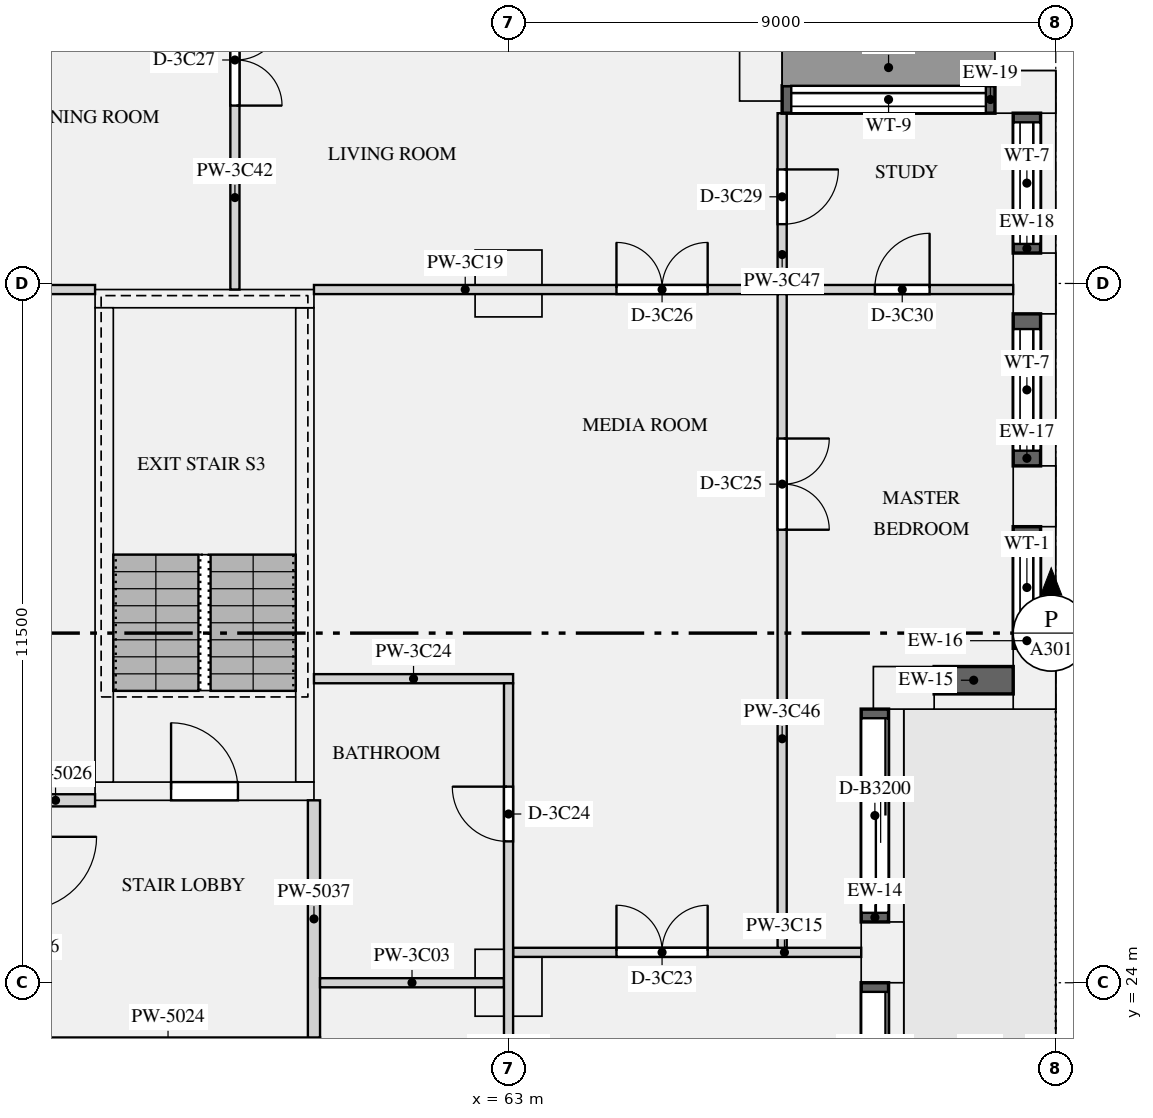
"""IFC4 building model, lengths in metres.
Left out: names, types, materials, properties, quantities, classifications, styles, units other than length and angle.
Written with IfcOpenShell. Run it as: python <this file> out.ifc"""

import sys

from ifc_helpers import new_model, si_unit, direction, frame, frame_2d, origin, origin_2d, place, context, subcontext, project, spatial, rectangle, extrude, element, fill, save


model = new_model("IFC4")
c1 = context("Model", 3, precision=1e-05, world=origin(), true_north=direction((0.0, 1.0)))
c2 = subcontext(c1, "Body", "Model", "MODEL_VIEW")
j1 = project(units=[si_unit("LENGTHUNIT", "METRE"), si_unit("PLANEANGLEUNIT", "RADIAN")], contexts=[c1])
p1 = place(None, origin())
s1 = spatial("IfcSite", under=j1, at=p1, CompositionType="ELEMENT")
p2 = place(p1, origin())
s2 = spatial("IfcBuilding", under=s1, at=p2, CompositionType="ELEMENT")
p3 = place(p2, frame((0.0, 0.0, 160.2)))
s3 = spatial("IfcBuildingStorey", under=s2, at=p3, CompositionType="ELEMENT", Elevation=160.2)
for number, where, z_axis, x_axis in (
    (1, (69.15, 24.5, 0.0), (0.0, 0.0, 1.0), (0.0, 1.0, 0.0)),
    (2, (69.5, 28.85, 0.0), (0.0, 0.0, 1.0), (1.0, 0.0, 0.0)),
    (3, (71.65, 29.0, 0.0), (0.0, 0.0, 1.0), (0.0, 1.0, 0.0)),
    (4, (71.65, 32.0, 0.0), (0.0, 0.0, 1.0), (0.0, 1.0, 0.0)),
    (5, (71.65, 35.5, 0.0), (0.0, 0.0, 1.0), (0.0, 1.0, 0.0)),
    (6, (71.5, 38.65, 0.0), (0.0, 0.0, 1.0), (-1.0, 0.0, 0.0)),
    (7, (67.15, 39.0, 0.0), (0.0, 0.0, 1.0), (0.0, 1.0, 0.0)),
):
    element("IfcColumn", number, at=place(p3, frame(where, z_axis=z_axis, x_axis=x_axis)), inside=s3, PredefinedType="USERDEFINED", context=c2, shape_type="SweptSolid", body=[
        extrude(rectangle(XDim=1.0, YDim=0.7, at=origin_2d()), origin(), (0.0, 0.0, 1.0), 3.15),
    ])
for number, where, z_axis, x_axis in (
    (8, (63.0, 24.0, 0.0), (0.0, 0.0, 1.0), (1.0, 0.0, 0.0)),
    (9, (63.0, 35.5, 0.0), (0.0, 0.0, 1.0), (1.0, 0.0, 0.0)),
):
    element("IfcColumn", number, at=place(p3, frame(where, z_axis=z_axis, x_axis=x_axis)), inside=s3, PredefinedType="COLUMN", context=c2, shape_type="SweptSolid", body=[
        extrude(rectangle(XDim=1.1, YDim=1.1, at=origin_2d()), origin(), (0.0, 0.0, 1.0), 3.15),
    ])
p4 = place(p3, frame((56.2, 27.15, 0.0), z_axis=(0.0, 0.0, 1.0), x_axis=(1.0, 0.0, 0.0)))
e10 = element("IfcWall", 10, at=p4, inside=s3, PredefinedType="SHEAR", context=c2, shape_type="SweptSolid", body=[
    extrude(rectangle(XDim=3.6, YDim=0.3, at=frame_2d((1.8, 0.0))), origin(), (0.0, 0.0, 1.0), 3.15),
])
p5 = place(p4, frame((1.25, 0.0, 0.0)))
e11 = element("IfcOpeningElement", 11, at=p5, cuts=e10, PredefinedType="OPENING", context=c2, shape_type="SweptSolid", body=[
    extrude(rectangle(XDim=1.1, YDim=2.1, at=frame_2d((0.55, 1.05))), frame((0.0, 0.16, 0.0), z_axis=(0.0, -1.0, 0.0), x_axis=(1.0, 0.0, 0.0)), (0.0, 0.0, 1.0), 0.32),
])
p6 = place(p3, frame((56.2, 35.25, 0.0), z_axis=(0.0, 0.0, 1.0), x_axis=(1.0, 0.0, 0.0)))
e12 = element("IfcWall", 12, at=p6, inside=s3, PredefinedType="SHEAR", context=c2, shape_type="SweptSolid", body=[
    extrude(rectangle(XDim=3.6, YDim=0.3, at=frame_2d((1.8, 0.0))), origin(), (0.0, 0.0, 1.0), 3.15),
])
for number, where, z_axis, x_axis in (
    (13, (56.35, 27.3, 0.0), (0.0, 0.0, 1.0), (0.0, 1.0, 0.0)),
    (14, (59.65, 27.3, 0.0), (0.0, 0.0, 1.0), (0.0, 1.0, 0.0)),
):
    element("IfcWall", number, at=place(p3, frame(where, z_axis=z_axis, x_axis=x_axis)), inside=s3, PredefinedType="SHEAR", context=c2, shape_type="SweptSolid", body=[
        extrude(rectangle(XDim=7.8, YDim=0.3, at=frame_2d((3.9, 0.0))), origin(), (0.0, 0.0, 1.0), 3.15),
    ])
p7 = place(p3, frame((69.025, 21.0, 0.0), z_axis=(0.0, 0.0, 1.0), x_axis=(0.0, 1.0, 0.0)))
e15 = element("IfcWall", 15, at=p7, inside=s3, PredefinedType="SOLIDWALL", context=c2, shape_type="SweptSolid", body=[
    extrude(rectangle(XDim=3.0, YDim=0.45, at=frame_2d((1.5, 0.0))), origin(), (0.0, 0.0, 1.0), 2.83),
])
p8 = place(p7, frame((0.15, 0.0, 0.0)))
e16 = element("IfcOpeningElement", 16, at=p8, cuts=e15, PredefinedType="OPENING", context=c2, shape_type="SweptSolid", body=[
    extrude(rectangle(XDim=2.7, YDim=2.3, at=frame_2d((1.35, 1.15))), frame((0.0, 0.235, 0.0), z_axis=(0.0, -1.0, 0.0), x_axis=(1.0, 0.0, 0.0)), (0.0, 0.0, 1.0), 0.47),
])
p9 = place(p3, frame((69.025, 25.0, 0.0), z_axis=(0.0, 0.0, 1.0), x_axis=(0.0, 1.0, 0.0)))
e17 = element("IfcWall", 17, at=p9, inside=s3, PredefinedType="SOLIDWALL", context=c2, shape_type="SweptSolid", body=[
    extrude(rectangle(XDim=3.5, YDim=0.45, at=frame_2d((1.75, 0.0))), origin(), (0.0, 0.0, 1.0), 2.83),
])
p10 = place(p9, frame((0.15, 0.0, 0.0)))
e18 = element("IfcOpeningElement", 18, at=p10, cuts=e17, PredefinedType="OPENING", context=c2, shape_type="SweptSolid", body=[
    extrude(rectangle(XDim=3.2, YDim=2.3, at=frame_2d((1.6, 1.15))), frame((0.0, 0.235, 0.0), z_axis=(0.0, -1.0, 0.0), x_axis=(1.0, 0.0, 0.0)), (0.0, 0.0, 1.0), 0.47),
])
p11 = place(p3, frame((70.0, 28.975, 0.9), z_axis=(0.0, 0.0, 1.0), x_axis=(1.0, 0.0, 0.0)))
e19 = element("IfcWall", 19, at=p11, inside=s3, PredefinedType="SOLIDWALL", context=c2, shape_type="SweptSolid", body=[
    extrude(rectangle(XDim=1.3, YDim=0.45, at=frame_2d((0.65, 0.0))), origin(), (0.0, 0.0, 1.0), 1.93),
])
p12 = place(p3, frame((71.525, 29.5, 0.9), z_axis=(0.0, 0.0, 1.0), x_axis=(0.0, 1.0, 0.0)))
e20 = element("IfcWall", 20, at=p12, inside=s3, PredefinedType="SOLIDWALL", context=c2, shape_type="SweptSolid", body=[
    extrude(rectangle(XDim=2.0, YDim=0.45, at=frame_2d((1.0, 0.0))), origin(), (0.0, 0.0, 1.0), 1.93),
])
p13 = place(p12, frame((0.25, 0.0, 0.15)))
e21 = element("IfcOpeningElement", 21, at=p13, cuts=e20, PredefinedType="OPENING", context=c2, shape_type="SweptSolid", body=[
    extrude(rectangle(XDim=1.5, YDim=1.5, at=frame_2d((0.75, 0.75))), frame((0.0, 0.235, 0.0), z_axis=(0.0, -1.0, 0.0), x_axis=(1.0, 0.0, 0.0)), (0.0, 0.0, 1.0), 0.47),
])
p14 = place(p3, frame((71.525, 32.5, 0.9), z_axis=(0.0, 0.0, 1.0), x_axis=(0.0, 1.0, 0.0)))
e22 = element("IfcWall", 22, at=p14, inside=s3, PredefinedType="SOLIDWALL", context=c2, shape_type="SweptSolid", body=[
    extrude(rectangle(XDim=2.5, YDim=0.45, at=frame_2d((1.25, 0.0))), origin(), (0.0, 0.0, 1.0), 1.93),
])
p15 = place(p14, frame((0.25, 0.0, 0.15)))
e23 = element("IfcOpeningElement", 23, at=p15, cuts=e22, PredefinedType="OPENING", context=c2, shape_type="SweptSolid", body=[
    extrude(rectangle(XDim=2.0, YDim=1.5, at=frame_2d((1.0, 0.75))), frame((0.0, 0.235, 0.0), z_axis=(0.0, -1.0, 0.0), x_axis=(1.0, 0.0, 0.0)), (0.0, 0.0, 1.0), 0.47),
])
p16 = place(p3, frame((71.525, 36.0, 0.9), z_axis=(0.0, 0.0, 1.0), x_axis=(0.0, 1.0, 0.0)))
e24 = element("IfcWall", 24, at=p16, inside=s3, PredefinedType="SOLIDWALL", context=c2, shape_type="SweptSolid", body=[
    extrude(rectangle(XDim=2.3, YDim=0.45, at=frame_2d((1.15, 0.0))), origin(), (0.0, 0.0, 1.0), 1.93),
])
p17 = place(p16, frame((0.15, 0.0, 0.15)))
e25 = element("IfcOpeningElement", 25, at=p17, cuts=e24, PredefinedType="OPENING", context=c2, shape_type="SweptSolid", body=[
    extrude(rectangle(XDim=2.0, YDim=1.5, at=frame_2d((1.0, 0.75))), frame((0.0, 0.235, 0.0), z_axis=(0.0, -1.0, 0.0), x_axis=(1.0, 0.0, 0.0)), (0.0, 0.0, 1.0), 0.47),
])
p18 = place(p3, frame((71.0, 38.525, 0.9), z_axis=(0.0, 0.0, 1.0), x_axis=(-1.0, 0.0, 0.0)))
e26 = element("IfcWall", 26, at=p18, inside=s3, PredefinedType="SOLIDWALL", context=c2, shape_type="SweptSolid", body=[
    extrude(rectangle(XDim=3.5, YDim=0.45, at=frame_2d((1.75, 0.0))), origin(), (0.0, 0.0, 1.0), 1.93),
])
p19 = place(p18, frame((0.15, 0.0, 0.15)))
e27 = element("IfcOpeningElement", 27, at=p19, cuts=e26, PredefinedType="OPENING", context=c2, shape_type="SweptSolid", body=[
    extrude(rectangle(XDim=3.2, YDim=1.5, at=frame_2d((1.6, 0.75))), frame((0.0, 0.235, 0.0), z_axis=(0.0, -1.0, 0.0), x_axis=(1.0, 0.0, 0.0)), (0.0, 0.0, 1.0), 0.47),
])
p20 = place(p3, frame((54.9, 23.0, 0.0), z_axis=(0.0, 0.0, 1.0), x_axis=(1.0, 0.0, 0.0)))
e28 = element("IfcWall", 28, at=p20, inside=s3, PredefinedType="PARTITIONING", context=c2, shape_type="SweptSolid", body=[
    extrude(rectangle(XDim=5.0, YDim=0.2, at=frame_2d((2.5, 0.0))), origin(), (0.0, 0.0, 1.0), 2.83),
])
p21 = place(p3, frame((54.9, 27.0, 0.0), z_axis=(0.0, 0.0, 1.0), x_axis=(1.0, 0.0, 0.0)))
e29 = element("IfcWall", 29, at=p21, inside=s3, PredefinedType="PARTITIONING", context=c2, shape_type="SweptSolid", body=[
    extrude(rectangle(XDim=1.3, YDim=0.2, at=frame_2d((0.65, 0.0))), origin(), (0.0, 0.0, 1.0), 2.83),
])
p22 = place(p3, frame((59.8, 23.1, 0.0), z_axis=(0.0, 0.0, 1.0), x_axis=(0.0, 1.0, 0.0)))
e30 = element("IfcWall", 30, at=p22, inside=s3, PredefinedType="PARTITIONING", context=c2, shape_type="SweptSolid", body=[
    extrude(rectangle(XDim=3.9, YDim=0.2, at=frame_2d((1.95, 0.0))), origin(), (0.0, 0.0, 1.0), 2.83),
])
p23 = place(p3, frame((59.9, 24.0, 0.0), z_axis=(0.0, 0.0, 1.0), x_axis=(1.0, 0.0, 0.0)))
e31 = element("IfcWall", 31, at=p23, inside=s3, PredefinedType="PARTITIONING", context=c2, shape_type="SweptSolid", body=[
    extrude(rectangle(XDim=3.025, YDim=0.15, at=frame_2d((1.513, 0.0))), origin(), (0.0, 0.0, 1.0), 2.83),
])
p24 = place(p3, frame((63.075, 24.5, 0.0), z_axis=(0.0, 0.0, 1.0), x_axis=(1.0, 0.0, 0.0)))
e32 = element("IfcWall", 32, at=p24, inside=s3, PredefinedType="PARTITIONING", context=c2, shape_type="SweptSolid", body=[
    extrude(rectangle(XDim=5.725, YDim=0.15, at=frame_2d((2.863, 0.0))), origin(), (0.0, 0.0, 1.0), 2.83),
])
p25 = place(p24, frame((1.7, 0.0, 0.0)))
e33 = element("IfcOpeningElement", 33, at=p25, cuts=e32, PredefinedType="OPENING", context=c2, shape_type="SweptSolid", body=[
    extrude(rectangle(XDim=1.5, YDim=2.1, at=frame_2d((0.75, 1.05))), frame((0.0, 0.085, 0.0), z_axis=(0.0, -1.0, 0.0), x_axis=(1.0, 0.0, 0.0)), (0.0, 0.0, 1.0), 0.17),
])
p26 = place(p3, frame((49.425, 35.4, 0.0), z_axis=(0.0, 0.0, 1.0), x_axis=(1.0, 0.0, 0.0)))
e34 = element("IfcWall", 34, at=p26, inside=s3, PredefinedType="PARTITIONING", context=c2, shape_type="SweptSolid", body=[
    extrude(rectangle(XDim=6.775, YDim=0.15, at=frame_2d((3.387, 0.0))), origin(), (0.0, 0.0, 1.0), 2.83),
])
p27 = place(p26, frame((1.6, 0.0, 0.0)))
e35 = element("IfcOpeningElement", 35, at=p27, cuts=e34, PredefinedType="OPENING", context=c2, shape_type="SweptSolid", body=[
    extrude(rectangle(XDim=0.9, YDim=2.1, at=frame_2d((0.45, 1.05))), frame((0.0, 0.085, 0.0), z_axis=(0.0, -1.0, 0.0), x_axis=(1.0, 0.0, 0.0)), (0.0, 0.0, 1.0), 0.17),
])
p28 = place(p3, frame((59.8, 35.4, 0.0), z_axis=(0.0, 0.0, 1.0), x_axis=(1.0, 0.0, 0.0)))
e36 = element("IfcWall", 36, at=p28, inside=s3, PredefinedType="PARTITIONING", context=c2, shape_type="SweptSolid", body=[
    extrude(rectangle(XDim=11.5, YDim=0.15, at=frame_2d((5.75, 0.0))), origin(), (0.0, 0.0, 1.0), 2.83),
])
p29 = place(p28, frame((4.975, 0.0, 0.0)))
e37 = element("IfcOpeningElement", 37, at=p29, cuts=e36, PredefinedType="OPENING", context=c2, shape_type="SweptSolid", body=[
    extrude(rectangle(XDim=1.5, YDim=2.1, at=frame_2d((0.75, 1.05))), frame((0.0, 0.085, 0.0), z_axis=(0.0, -1.0, 0.0), x_axis=(1.0, 0.0, 0.0)), (0.0, 0.0, 1.0), 0.17),
])
p30 = place(p28, frame((9.225, 0.0, 0.0)))
e38 = element("IfcOpeningElement", 38, at=p30, cuts=e36, PredefinedType="OPENING", context=c2, shape_type="SweptSolid", body=[
    extrude(rectangle(XDim=0.9, YDim=2.1, at=frame_2d((0.45, 1.05))), frame((0.0, 0.085, 0.0), z_axis=(0.0, -1.0, 0.0), x_axis=(1.0, 0.0, 0.0)), (0.0, 0.0, 1.0), 0.17),
])
p31 = place(p3, frame((59.8, 29.0, 0.0), z_axis=(0.0, 0.0, 1.0), x_axis=(1.0, 0.0, 0.0)))
e39 = element("IfcWall", 39, at=p31, inside=s3, PredefinedType="PARTITIONING", context=c2, shape_type="SweptSolid", body=[
    extrude(rectangle(XDim=3.275, YDim=0.15, at=frame_2d((1.637, 0.0))), origin(), (0.0, 0.0, 1.0), 2.83),
])
p32 = place(p3, frame((58.5, 35.4, 0.0), z_axis=(0.0, 0.0, 1.0), x_axis=(0.0, 1.0, 0.0)))
e40 = element("IfcWall", 40, at=p32, inside=s3, PredefinedType="PARTITIONING", context=c2, shape_type="SweptSolid", body=[
    extrude(rectangle(XDim=7.4, YDim=0.15, at=frame_2d((3.7, 0.0))), origin(), (0.0, 0.0, 1.0), 2.83),
])
p33 = place(p32, frame((3.025, 0.0, 0.0)))
e41 = element("IfcOpeningElement", 41, at=p33, cuts=e40, PredefinedType="OPENING", context=c2, shape_type="SweptSolid", body=[
    extrude(rectangle(XDim=1.5, YDim=2.1, at=frame_2d((0.75, 1.05))), frame((0.0, 0.085, 0.0), z_axis=(0.0, -1.0, 0.0), x_axis=(1.0, 0.0, 0.0)), (0.0, 0.0, 1.0), 0.17),
])
p34 = place(p3, frame((63.0, 12.575, 0.0), z_axis=(0.0, 0.0, 1.0), x_axis=(0.0, 1.0, 0.0)))
e42 = element("IfcWall", 42, at=p34, inside=s3, PredefinedType="PARTITIONING", context=c2, shape_type="SweptSolid", body=[
    extrude(rectangle(XDim=16.35, YDim=0.15, at=frame_2d((8.175, 0.0))), origin(), (0.0, 0.0, 1.0), 2.83),
])
p35 = place(p34, frame((5.225, 0.0, 0.0)))
e43 = element("IfcOpeningElement", 43, at=p35, cuts=e42, PredefinedType="OPENING", context=c2, shape_type="SweptSolid", body=[
    extrude(rectangle(XDim=0.9, YDim=2.1, at=frame_2d((0.45, 1.05))), frame((0.0, 0.085, 0.0), z_axis=(0.0, -1.0, 0.0), x_axis=(1.0, 0.0, 0.0)), (0.0, 0.0, 1.0), 0.17),
])
p36 = place(p34, frame((13.75, 0.0, 0.0)))
e44 = element("IfcOpeningElement", 44, at=p36, cuts=e42, PredefinedType="OPENING", context=c2, shape_type="SweptSolid", body=[
    extrude(rectangle(XDim=0.9, YDim=2.1, at=frame_2d((0.45, 1.05))), frame((0.0, 0.085, 0.0), z_axis=(0.0, -1.0, 0.0), x_axis=(1.0, 0.0, 0.0)), (0.0, 0.0, 1.0), 0.17),
])
p37 = place(p3, frame((67.5, 24.575, 0.0), z_axis=(0.0, 0.0, 1.0), x_axis=(0.0, 1.0, 0.0)))
e45 = element("IfcWall", 45, at=p37, inside=s3, PredefinedType="PARTITIONING", context=c2, shape_type="SweptSolid", body=[
    extrude(rectangle(XDim=10.75, YDim=0.15, at=frame_2d((5.375, 0.0))), origin(), (0.0, 0.0, 1.0), 2.83),
])
p38 = place(p37, frame((6.875, 0.0, 0.0)))
e46 = element("IfcOpeningElement", 46, at=p38, cuts=e45, PredefinedType="OPENING", context=c2, shape_type="SweptSolid", body=[
    extrude(rectangle(XDim=1.5, YDim=2.1, at=frame_2d((0.75, 1.05))), frame((0.0, 0.085, 0.0), z_axis=(0.0, -1.0, 0.0), x_axis=(1.0, 0.0, 0.0)), (0.0, 0.0, 1.0), 0.17),
])
p39 = place(p3, frame((67.5, 35.475, 0.0), z_axis=(0.0, 0.0, 1.0), x_axis=(0.0, 1.0, 0.0)))
e47 = element("IfcWall", 47, at=p39, inside=s3, PredefinedType="PARTITIONING", context=c2, shape_type="SweptSolid", body=[
    extrude(rectangle(XDim=2.825, YDim=0.15, at=frame_2d((1.413, 0.0))), origin(), (0.0, 0.0, 1.0), 2.83),
])
p40 = place(p39, frame((1.0, 0.0, 0.0)))
e48 = element("IfcOpeningElement", 48, at=p40, cuts=e47, PredefinedType="OPENING", context=c2, shape_type="SweptSolid", body=[
    extrude(rectangle(XDim=0.9, YDim=2.1, at=frame_2d((0.45, 1.05))), frame((0.0, 0.085, 0.0), z_axis=(0.0, -1.0, 0.0), x_axis=(1.0, 0.0, 0.0)), (0.0, 0.0, 1.0), 0.17),
])
p41 = place(p8, origin())
e49 = element("IfcDoor", 49, at=p41, inside=s3, OperationType="SLIDING_TO_LEFT", PredefinedType="DOOR", context=c2, shape_type="SweptSolid", body=[
    extrude(rectangle(XDim=2.7, YDim=2.3, at=frame_2d((1.35, 1.15))), frame((0.0, -0.07, 0.0), z_axis=(0.0, -1.0, 0.0), x_axis=(1.0, 0.0, 0.0)), (0.0, 0.0, 1.0), 0.05),
])
fill(e16, e49)
p42 = place(p10, origin())
e50 = element("IfcDoor", 50, at=p42, inside=s3, OperationType="SLIDING_TO_LEFT", PredefinedType="DOOR", context=c2, shape_type="SweptSolid", body=[
    extrude(rectangle(XDim=3.2, YDim=2.3, at=frame_2d((1.6, 1.15))), frame((0.0, -0.07, 0.0), z_axis=(0.0, -1.0, 0.0), x_axis=(1.0, 0.0, 0.0)), (0.0, 0.0, 1.0), 0.05),
])
fill(e18, e50)
p43 = place(p13, origin())
e51 = element("IfcWindow", 51, at=p43, inside=s3, PartitioningType="SINGLE_PANEL", PredefinedType="WINDOW", context=c2, shape_type="SweptSolid", body=[
    extrude(rectangle(XDim=1.5, YDim=1.5, at=frame_2d((0.75, 0.75))), frame((0.0, -0.065, 0.0), z_axis=(0.0, -1.0, 0.0), x_axis=(1.0, 0.0, 0.0)), (0.0, 0.0, 1.0), 0.06),
])
fill(e21, e51)
p44 = place(p15, origin())
e52 = element("IfcWindow", 52, at=p44, inside=s3, PartitioningType="SINGLE_PANEL", PredefinedType="WINDOW", context=c2, shape_type="SweptSolid", body=[
    extrude(rectangle(XDim=2.0, YDim=1.5, at=frame_2d((1.0, 0.75))), frame((0.0, -0.065, 0.0), z_axis=(0.0, -1.0, 0.0), x_axis=(1.0, 0.0, 0.0)), (0.0, 0.0, 1.0), 0.06),
])
fill(e23, e52)
p45 = place(p17, origin())
e53 = element("IfcWindow", 53, at=p45, inside=s3, PartitioningType="SINGLE_PANEL", PredefinedType="WINDOW", context=c2, shape_type="SweptSolid", body=[
    extrude(rectangle(XDim=2.0, YDim=1.5, at=frame_2d((1.0, 0.75))), frame((0.0, -0.065, 0.0), z_axis=(0.0, -1.0, 0.0), x_axis=(1.0, 0.0, 0.0)), (0.0, 0.0, 1.0), 0.06),
])
fill(e25, e53)
p46 = place(p19, origin())
e54 = element("IfcWindow", 54, at=p46, inside=s3, PartitioningType="SINGLE_PANEL", PredefinedType="WINDOW", context=c2, shape_type="SweptSolid", body=[
    extrude(rectangle(XDim=3.2, YDim=1.5, at=frame_2d((1.6, 0.75))), frame((0.0, -0.065, 0.0), z_axis=(0.0, -1.0, 0.0), x_axis=(1.0, 0.0, 0.0)), (0.0, 0.0, 1.0), 0.06),
])
fill(e27, e54)
p47 = place(p5, origin())
e55 = element("IfcDoor", 55, at=p47, inside=s3, OperationType="SINGLE_SWING_LEFT", PredefinedType="DOOR", context=c2, shape_type="SweptSolid", body=[
    extrude(rectangle(XDim=1.1, YDim=2.1, at=frame_2d((0.55, 1.05))), frame((0.0, 0.025, 0.0), z_axis=(0.0, -1.0, 0.0), x_axis=(1.0, 0.0, 0.0)), (0.0, 0.0, 1.0), 0.05),
])
fill(e11, e55)
p48 = place(p25, origin())
e56 = element("IfcDoor", 56, at=p48, inside=s3, OperationType="DOUBLE_DOOR_SINGLE_SWING", PredefinedType="DOOR", context=c2, shape_type="SweptSolid", body=[
    extrude(rectangle(XDim=1.5, YDim=2.1, at=frame_2d((0.75, 1.05))), frame((0.0, 0.025, 0.0), z_axis=(0.0, -1.0, 0.0), x_axis=(1.0, 0.0, 0.0)), (0.0, 0.0, 1.0), 0.05),
])
fill(e33, e56)
p49 = place(p36, origin())
e57 = element("IfcDoor", 57, at=p49, inside=s3, OperationType="SINGLE_SWING_RIGHT", PredefinedType="DOOR", context=c2, shape_type="SweptSolid", body=[
    extrude(rectangle(XDim=0.9, YDim=2.1, at=frame_2d((0.45, 1.05))), frame((0.0, 0.025, 0.0), z_axis=(0.0, -1.0, 0.0), x_axis=(1.0, 0.0, 0.0)), (0.0, 0.0, 1.0), 0.05),
])
fill(e44, e57)
p50 = place(p38, frame((1.5, 0.0, 0.0), z_axis=(0.0, 0.0, 1.0), x_axis=(-1.0, 0.0, 0.0)))
e58 = element("IfcDoor", 58, at=p50, inside=s3, OperationType="DOUBLE_DOOR_SINGLE_SWING", PredefinedType="DOOR", context=c2, shape_type="SweptSolid", body=[
    extrude(rectangle(XDim=1.5, YDim=2.1, at=frame_2d((0.75, 1.05))), frame((0.0, 0.025, 0.0), z_axis=(0.0, -1.0, 0.0), x_axis=(1.0, 0.0, 0.0)), (0.0, 0.0, 1.0), 0.05),
])
fill(e46, e58)
p51 = place(p29, origin())
e59 = element("IfcDoor", 59, at=p51, inside=s3, OperationType="DOUBLE_DOOR_SINGLE_SWING", PredefinedType="DOOR", context=c2, shape_type="SweptSolid", body=[
    extrude(rectangle(XDim=1.5, YDim=2.1, at=frame_2d((0.75, 1.05))), frame((0.0, 0.025, 0.0), z_axis=(0.0, -1.0, 0.0), x_axis=(1.0, 0.0, 0.0)), (0.0, 0.0, 1.0), 0.05),
])
fill(e37, e59)
p52 = place(p33, frame((1.5, 0.0, 0.0), z_axis=(0.0, 0.0, 1.0), x_axis=(-1.0, 0.0, 0.0)))
e60 = element("IfcDoor", 60, at=p52, inside=s3, OperationType="DOUBLE_DOOR_SINGLE_SWING", PredefinedType="DOOR", context=c2, shape_type="SweptSolid", body=[
    extrude(rectangle(XDim=1.5, YDim=2.1, at=frame_2d((0.75, 1.05))), frame((0.0, 0.025, 0.0), z_axis=(0.0, -1.0, 0.0), x_axis=(1.0, 0.0, 0.0)), (0.0, 0.0, 1.0), 0.05),
])
fill(e41, e60)
p53 = place(p40, frame((0.9, 0.0, 0.0), z_axis=(0.0, 0.0, 1.0), x_axis=(-1.0, 0.0, 0.0)))
e61 = element("IfcDoor", 61, at=p53, inside=s3, OperationType="SINGLE_SWING_LEFT", PredefinedType="DOOR", context=c2, shape_type="SweptSolid", body=[
    extrude(rectangle(XDim=0.9, YDim=2.1, at=frame_2d((0.45, 1.05))), frame((0.0, 0.025, 0.0), z_axis=(0.0, -1.0, 0.0), x_axis=(1.0, 0.0, 0.0)), (0.0, 0.0, 1.0), 0.05),
])
fill(e48, e61)
p54 = place(p30, origin())
e62 = element("IfcDoor", 62, at=p54, inside=s3, OperationType="SINGLE_SWING_RIGHT", PredefinedType="DOOR", context=c2, shape_type="SweptSolid", body=[
    extrude(rectangle(XDim=0.9, YDim=2.1, at=frame_2d((0.45, 1.05))), frame((0.0, 0.025, 0.0), z_axis=(0.0, -1.0, 0.0), x_axis=(1.0, 0.0, 0.0)), (0.0, 0.0, 1.0), 0.05),
])
fill(e38, e62)
save(model, sys.argv[1])
